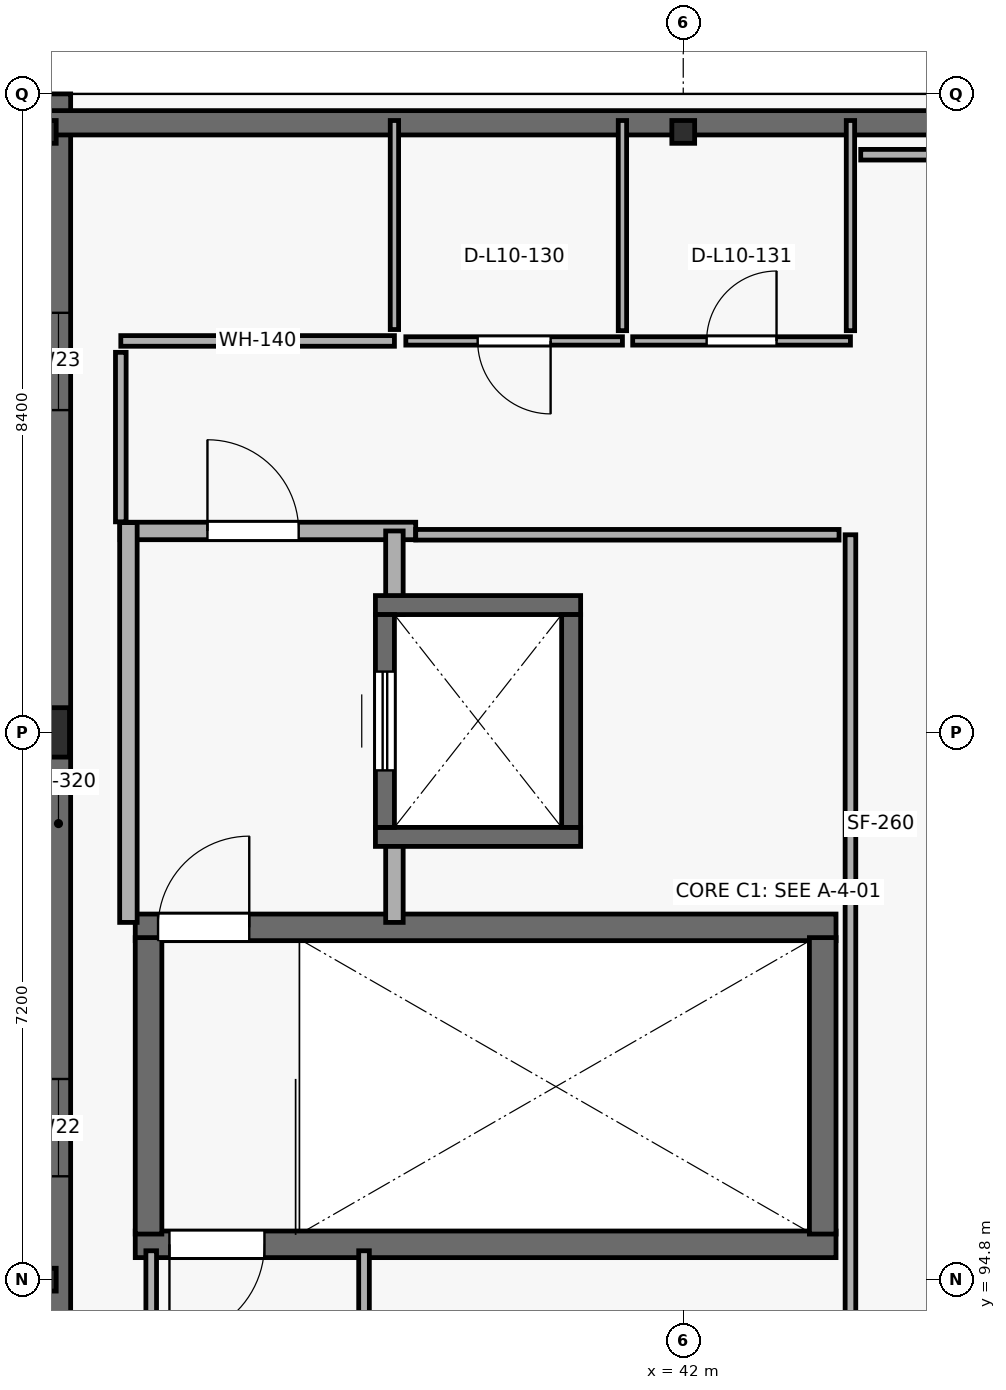
"""IFC4 building model, lengths in metres.
Left out: names, types, materials, properties, quantities, classifications, styles, units other than length and angle.
Written with IfcOpenShell. Run it as: python <this file> out.ifc"""

import sys

from ifc_helpers import new_model, si_unit, direction, frame, frame_2d, origin, origin_2d, place, context, subcontext, project, spatial, rectangle, hollow_rectangle, extrude, element, fill, save


model = new_model("IFC4")
c1 = context("Model", 3, precision=1e-05, world=origin(), true_north=direction((0.0, 1.0)))
c2 = subcontext(c1, "Body", "Model", "MODEL_VIEW")
j1 = project(units=[si_unit("LENGTHUNIT", "METRE"), si_unit("PLANEANGLEUNIT", "RADIAN")], contexts=[c1])
p1 = place(None, origin())
s1 = spatial("IfcSite", under=j1, at=p1, CompositionType="ELEMENT")
p2 = place(p1, origin())
s2 = spatial("IfcBuilding", under=s1, at=p2, CompositionType="ELEMENT")
p3 = place(p2, frame((0.0, 0.0, 44.7)))
s3 = spatial("IfcBuildingStorey", under=s2, at=p3, CompositionType="ELEMENT", Elevation=44.7)
p4 = place(p3, frame((33.6, 94.8, 0.0), z_axis=(0.0, 0.0, 1.0), x_axis=(1.0, 0.0, 0.0)))
e1 = element("IfcColumn", 1, at=p4, inside=s3, PredefinedType="COLUMN", context=c2, shape_type="SweptSolid", body=[
    extrude(hollow_rectangle(XDim=0.3, YDim=0.3, WallThickness=0.012, at=origin_2d()), origin(), (0.0, 0.0, 1.0), 4.8),
])
p5 = place(p3, frame((33.6, 102.0, 0.0), z_axis=(0.0, 0.0, 1.0), x_axis=(1.0, 0.0, 0.0)))
e2 = element("IfcColumn", 2, at=p5, inside=s3, PredefinedType="COLUMN", context=c2, shape_type="SweptSolid", body=[
    extrude(rectangle(XDim=0.65, YDim=0.65, at=origin_2d()), origin(), (0.0, 0.0, 1.0), 4.8),
])
for number, where, z_axis, x_axis in (
    (3, (33.6, 109.9, 0.0), (0.0, 0.0, 1.0), (1.0, 0.0, 0.0)),
    (4, (42.0, 109.9, 0.0), (0.0, 0.0, 1.0), (1.0, 0.0, 0.0)),
):
    element("IfcColumn", number, at=place(p3, frame(where, z_axis=z_axis, x_axis=x_axis)), inside=s3, PredefinedType="COLUMN", context=c2, shape_type="SweptSolid", body=[
        extrude(hollow_rectangle(XDim=0.3, YDim=0.3, WallThickness=0.012, at=origin_2d()), origin(), (0.0, 0.0, 1.0), 8.689),
    ])
p6 = place(p3, frame((33.78, 91.2, 0.0), z_axis=(0.0, 0.0, 1.0), x_axis=(0.0, 1.0, 0.0)))
e5 = element("IfcWall", 5, at=p6, inside=s3, PredefinedType="SOLIDWALL", context=c2, shape_type="SweptSolid", body=[
    extrude(rectangle(XDim=19.2, YDim=0.32, at=frame_2d((9.6, 0.0))), origin(), (0.0, 0.0, 1.0), 4.58),
])
p7 = place(p6, frame((4.96, 0.0, 0.75)))
e6 = element("IfcOpeningElement", 6, at=p7, cuts=e5, PredefinedType="OPENING", context=c2, shape_type="SweptSolid", body=[
    extrude(rectangle(XDim=1.28, YDim=2.25, at=frame_2d((0.64, 1.125))), frame((0.0, 0.17, 0.0), z_axis=(0.0, -1.0, 0.0), x_axis=(1.0, 0.0, 0.0)), (0.0, 0.0, 1.0), 0.34),
])
p8 = place(p6, frame((15.04, 0.0, 0.75)))
e7 = element("IfcOpeningElement", 7, at=p8, cuts=e5, PredefinedType="OPENING", context=c2, shape_type="SweptSolid", body=[
    extrude(rectangle(XDim=1.28, YDim=2.65, at=frame_2d((0.64, 1.325))), frame((0.0, 0.17, 0.0), z_axis=(0.0, -1.0, 0.0), x_axis=(1.0, 0.0, 0.0)), (0.0, 0.0, 1.0), 0.34),
])
p9 = place(p3, frame((33.6, 110.02, 0.0), z_axis=(0.0, 0.0, 1.0), x_axis=(1.0, 0.0, 0.0)))
e8 = element("IfcWall", 8, at=p9, inside=s3, PredefinedType="SOLIDWALL", context=c2, shape_type="SweptSolid", body=[
    extrude(rectangle(XDim=33.6, YDim=0.32, at=frame_2d((16.8, 0.0))), origin(), (0.0, 0.0, 1.0), 4.58),
])
p10 = place(p3, frame((34.79, 95.265, 0.0), z_axis=(0.0, 0.0, 1.0), x_axis=(1.0, 0.0, 0.0)))
e9 = element("IfcWall", 9, at=p10, inside=s3, PredefinedType="SHEAR", context=c2, shape_type="SweptSolid", body=[
    extrude(rectangle(XDim=9.22, YDim=0.35, at=frame_2d((4.61, 0.0))), origin(), (0.0, 0.0, 1.0), 4.58),
])
p11 = place(p10, frame((0.45, 0.0, 0.0)))
e10 = element("IfcOpeningElement", 10, at=p11, cuts=e9, PredefinedType="OPENING", context=c2, shape_type="SweptSolid", body=[
    extrude(rectangle(XDim=1.25, YDim=2.2, at=frame_2d((0.625, 1.1))), frame((0.0, 0.185, 0.0), z_axis=(0.0, -1.0, 0.0), x_axis=(1.0, 0.0, 0.0)), (0.0, 0.0, 1.0), 0.37),
])
p12 = place(p3, frame((44.01, 99.435, 0.0), z_axis=(0.0, 0.0, 1.0), x_axis=(-1.0, 0.0, 0.0)))
e11 = element("IfcWall", 11, at=p12, inside=s3, PredefinedType="SHEAR", context=c2, shape_type="SweptSolid", body=[
    extrude(rectangle(XDim=9.22, YDim=0.35, at=frame_2d((4.61, 0.0))), origin(), (0.0, 0.0, 1.0), 4.58),
])
p13 = place(p12, frame((7.72, 0.0, 0.0)))
e12 = element("IfcOpeningElement", 12, at=p13, cuts=e11, PredefinedType="OPENING", context=c2, shape_type="SweptSolid", body=[
    extrude(rectangle(XDim=1.2, YDim=2.2, at=frame_2d((0.6, 1.1))), frame((0.0, 0.185, 0.0), z_axis=(0.0, -1.0, 0.0), x_axis=(1.0, 0.0, 0.0)), (0.0, 0.0, 1.0), 0.37),
])
for number, where, z_axis, x_axis in (
    (13, (34.965, 95.4, 0.0), (0.0, 0.0, 1.0), (0.0, 1.0, 0.0)),
    (14, (43.835, 99.3, 0.0), (0.0, 0.0, 1.0), (0.0, -1.0, 0.0)),
):
    element("IfcWall", number, at=place(p3, frame(where, z_axis=z_axis, x_axis=x_axis)), inside=s3, PredefinedType="SHEAR", context=c2, shape_type="SweptSolid", body=[
        extrude(rectangle(XDim=3.9, YDim=0.35, at=frame_2d((1.95, 0.0))), origin(), (0.0, 0.0, 1.0), 4.58),
    ])
p14 = place(p3, frame((34.59, 104.65, 0.0), z_axis=(0.0, 0.0, 1.0), x_axis=(1.0, 0.0, 0.0)))
e15 = element("IfcWall", 15, at=p14, inside=s3, PredefinedType="PARTITIONING", context=c2, shape_type="SweptSolid", body=[
    extrude(rectangle(XDim=3.89, YDim=0.23, at=frame_2d((1.945, 0.0))), origin(), (0.0, 0.0, 1.0), 4.58),
])
p15 = place(p14, frame((1.15, 0.0, 0.0)))
e16 = element("IfcOpeningElement", 16, at=p15, cuts=e15, PredefinedType="OPENING", context=c2, shape_type="SweptSolid", body=[
    extrude(rectangle(XDim=1.2, YDim=2.2, at=frame_2d((0.6, 1.1))), frame((0.0, 0.125, 0.0), z_axis=(0.0, -1.0, 0.0), x_axis=(1.0, 0.0, 0.0)), (0.0, 0.0, 1.0), 0.25),
])
p16 = place(p3, frame((34.7, 99.5, 0.0), z_axis=(0.0, 0.0, 1.0), x_axis=(0.0, 1.0, 0.0)))
e17 = element("IfcWall", 17, at=p16, inside=s3, PredefinedType="PARTITIONING", context=c2, shape_type="SweptSolid", body=[
    extrude(rectangle(XDim=5.26, YDim=0.23, at=frame_2d((2.63, 0.0))), origin(), (0.0, 0.0, 1.0), 4.58),
])
p17 = place(p3, frame((38.2, 104.65, 0.0), z_axis=(0.0, 0.0, 1.0), x_axis=(0.0, -1.0, 0.0)))
e18 = element("IfcWall", 18, at=p17, inside=s3, PredefinedType="PARTITIONING", context=c2, shape_type="SweptSolid", body=[
    extrude(rectangle(XDim=1.1, YDim=0.23, at=frame_2d((0.55, 0.0))), origin(), (0.0, 0.0, 1.0), 4.58),
])
p18 = place(p3, frame((38.2, 100.75, 0.0), z_axis=(0.0, 0.0, 1.0), x_axis=(0.0, -1.0, 0.0)))
e19 = element("IfcWall", 19, at=p18, inside=s3, PredefinedType="PARTITIONING", context=c2, shape_type="SweptSolid", body=[
    extrude(rectangle(XDim=1.25, YDim=0.23, at=frame_2d((0.625, 0.0))), origin(), (0.0, 0.0, 1.0), 4.58),
])
for number, where, z_axis, x_axis in (
    (20, (37.95, 100.625, 0.0), (0.0, 0.0, 1.0), (1.0, 0.0, 0.0)),
    (21, (40.65, 103.675, 0.0), (0.0, 0.0, 1.0), (-1.0, 0.0, 0.0)),
):
    element("IfcWall", number, at=place(p3, frame(where, z_axis=z_axis, x_axis=x_axis)), inside=s3, PredefinedType="SHEAR", context=c2, shape_type="SweptSolid", body=[
        extrude(rectangle(XDim=2.7, YDim=0.25, at=frame_2d((1.35, 0.0))), origin(), (0.0, 0.0, 1.0), 4.58),
    ])
p19 = place(p3, frame((38.075, 100.75, 0.0), z_axis=(0.0, 0.0, 1.0), x_axis=(0.0, 1.0, 0.0)))
e22 = element("IfcWall", 22, at=p19, inside=s3, PredefinedType="SHEAR", context=c2, shape_type="SweptSolid", body=[
    extrude(rectangle(XDim=2.8, YDim=0.25, at=frame_2d((1.4, 0.0))), origin(), (0.0, 0.0, 1.0), 4.58),
])
p20 = place(p19, frame((0.75, 0.0, 0.0)))
e23 = element("IfcOpeningElement", 23, at=p20, cuts=e22, PredefinedType="OPENING", context=c2, shape_type="SweptSolid", body=[
    extrude(rectangle(XDim=1.3, YDim=2.25, at=frame_2d((0.65, 1.125))), frame((0.0, 0.135, 0.0), z_axis=(0.0, -1.0, 0.0), x_axis=(1.0, 0.0, 0.0)), (0.0, 0.0, 1.0), 0.27),
])
p21 = place(p3, frame((40.525, 103.55, 0.0), z_axis=(0.0, 0.0, 1.0), x_axis=(0.0, -1.0, 0.0)))
e24 = element("IfcWall", 24, at=p21, inside=s3, PredefinedType="SHEAR", context=c2, shape_type="SweptSolid", body=[
    extrude(rectangle(XDim=2.8, YDim=0.25, at=frame_2d((1.4, 0.0))), origin(), (0.0, 0.0, 1.0), 4.58),
])
p22 = place(p3, frame((44.2, 104.6, 0.0), z_axis=(0.0, 0.0, 1.0), x_axis=(0.0, -1.0, 0.0)))
e25 = element("IfcWall", 25, at=p22, inside=s3, PredefinedType="PARTITIONING", context=c2, shape_type="SweptSolid", body=[
    extrude(rectangle(XDim=10.75, YDim=0.14, at=frame_2d((5.375, 0.0))), origin(), (0.0, 0.0, 1.0), 4.58),
])
p23 = place(p3, frame((38.48, 104.6, 0.0), z_axis=(0.0, 0.0, 1.0), x_axis=(1.0, 0.0, 0.0)))
e26 = element("IfcWall", 26, at=p23, inside=s3, PredefinedType="PARTITIONING", context=c2, shape_type="SweptSolid", body=[
    extrude(rectangle(XDim=5.57, YDim=0.14, at=frame_2d((2.785, 0.0))), origin(), (0.0, 0.0, 1.0), 4.58),
])
p24 = place(p3, frame((38.2, 107.15, 0.0), z_axis=(0.0, 0.0, 1.0), x_axis=(-1.0, 0.0, 0.0)))
e27 = element("IfcWall", 27, at=p24, inside=s3, PredefinedType="PARTITIONING", context=c2, shape_type="SweptSolid", body=[
    extrude(rectangle(XDim=3.6, YDim=0.14, at=frame_2d((1.8, 0.0))), origin(), (0.0, 0.0, 1.0), 4.58),
])
p25 = place(p3, frame((41.2, 107.15, 0.0), z_axis=(0.0, 0.0, 1.0), x_axis=(-1.0, 0.0, 0.0)))
e28 = element("IfcWall", 28, at=p25, inside=s3, PredefinedType="PARTITIONING", context=c2, shape_type="SweptSolid", body=[
    extrude(rectangle(XDim=2.85, YDim=0.11, at=frame_2d((1.425, 0.0))), origin(), (0.0, 0.0, 1.0), 4.58),
])
p26 = place(p25, frame((0.945, 0.0, 0.0)))
e29 = element("IfcOpeningElement", 29, at=p26, cuts=e28, PredefinedType="OPENING", context=c2, shape_type="SweptSolid", body=[
    extrude(rectangle(XDim=0.96, YDim=2.14, at=frame_2d((0.48, 1.07))), frame((0.0, 0.065, 0.0), z_axis=(0.0, -1.0, 0.0), x_axis=(1.0, 0.0, 0.0)), (0.0, 0.0, 1.0), 0.13),
])
p27 = place(p3, frame((44.2, 107.15, 0.0), z_axis=(0.0, 0.0, 1.0), x_axis=(-1.0, 0.0, 0.0)))
e30 = element("IfcWall", 30, at=p27, inside=s3, PredefinedType="PARTITIONING", context=c2, shape_type="SweptSolid", body=[
    extrude(rectangle(XDim=2.865, YDim=0.11, at=frame_2d((1.433, 0.0))), origin(), (0.0, 0.0, 1.0), 4.58),
])
p28 = place(p27, frame((0.972, 0.0, 0.0)))
e31 = element("IfcOpeningElement", 31, at=p28, cuts=e30, PredefinedType="OPENING", context=c2, shape_type="SweptSolid", body=[
    extrude(rectangle(XDim=0.92, YDim=2.12, at=frame_2d((0.46, 1.06))), frame((0.0, 0.065, 0.0), z_axis=(0.0, -1.0, 0.0), x_axis=(1.0, 0.0, 0.0)), (0.0, 0.0, 1.0), 0.13),
])
p29 = place(p3, frame((41.2, 110.05, 0.0), z_axis=(0.0, 0.0, 1.0), x_axis=(0.0, -1.0, 0.0)))
e32 = element("IfcWall", 32, at=p29, inside=s3, PredefinedType="PARTITIONING", context=c2, shape_type="SweptSolid", body=[
    extrude(rectangle(XDim=2.765, YDim=0.11, at=frame_2d((1.383, 0.0))), origin(), (0.0, 0.0, 1.0), 4.58),
])
p30 = place(p3, frame((38.2, 107.3, 0.0), z_axis=(0.0, 0.0, 1.0), x_axis=(0.0, 1.0, 0.0)))
e33 = element("IfcWall", 33, at=p30, inside=s3, PredefinedType="PARTITIONING", context=c2, shape_type="SweptSolid", body=[
    extrude(rectangle(XDim=2.75, YDim=0.11, at=frame_2d((1.375, 0.0))), origin(), (0.0, 0.0, 1.0), 4.58),
])
p31 = place(p3, frame((44.2, 110.05, 0.0), z_axis=(0.0, 0.0, 1.0), x_axis=(0.0, -1.0, 0.0)))
e34 = element("IfcWall", 34, at=p31, inside=s3, PredefinedType="PARTITIONING", context=c2, shape_type="SweptSolid", body=[
    extrude(rectangle(XDim=2.765, YDim=0.11, at=frame_2d((1.383, 0.0))), origin(), (0.0, 0.0, 1.0), 4.58),
])
p32 = place(p3, frame((34.6, 107.0, 0.0), z_axis=(0.0, 0.0, 1.0), x_axis=(0.0, -1.0, 0.0)))
e35 = element("IfcWall", 35, at=p32, inside=s3, PredefinedType="PARTITIONING", context=c2, shape_type="SweptSolid", body=[
    extrude(rectangle(XDim=2.23, YDim=0.14, at=frame_2d((1.115, 0.0))), origin(), (0.0, 0.0, 1.0), 4.58),
])
p33 = place(p3, frame((46.25, 109.6, 0.0), z_axis=(0.0, 0.0, 1.0), x_axis=(-1.0, 0.0, 0.0)))
e36 = element("IfcWall", 36, at=p33, inside=s3, PredefinedType="PARTITIONING", context=c2, shape_type="SweptSolid", body=[
    extrude(rectangle(XDim=1.915, YDim=0.14, at=frame_2d((0.958, 0.0))), origin(), (0.0, 0.0, 1.0), 4.58),
])
p34 = place(p3, frame((37.8, 94.0, 0.0), z_axis=(0.0, 0.0, 1.0), x_axis=(0.0, 1.0, 0.0)))
e37 = element("IfcWall", 37, at=p34, inside=s3, PredefinedType="PARTITIONING", context=c2, shape_type="SweptSolid", body=[
    extrude(rectangle(XDim=1.18, YDim=0.14, at=frame_2d((0.59, 0.0))), origin(), (0.0, 0.0, 1.0), 4.58),
])
p35 = place(p3, frame((35.0, 95.18, 0.0), z_axis=(0.0, 0.0, 1.0), x_axis=(0.0, -1.0, 0.0)))
e38 = element("IfcWall", 38, at=p35, inside=s3, PredefinedType="PARTITIONING", context=c2, shape_type="SweptSolid", body=[
    extrude(rectangle(XDim=1.33, YDim=0.14, at=frame_2d((0.665, 0.0))), origin(), (0.0, 0.0, 1.0), 4.58),
])
p36 = place(p7, origin())
e39 = element("IfcWindow", 39, at=p36, inside=s3, PartitioningType="SINGLE_PANEL", PredefinedType="WINDOW", context=c2, shape_type="SweptSolid", body=[
    extrude(rectangle(XDim=1.28, YDim=2.25, at=frame_2d((0.64, 1.125))), frame((0.0, 0.03, 0.0), z_axis=(0.0, -1.0, 0.0), x_axis=(1.0, 0.0, 0.0)), (0.0, 0.0, 1.0), 0.06),
])
fill(e6, e39)
p37 = place(p8, origin())
e40 = element("IfcWindow", 40, at=p37, inside=s3, PartitioningType="SINGLE_PANEL", PredefinedType="WINDOW", context=c2, shape_type="SweptSolid", body=[
    extrude(rectangle(XDim=1.28, YDim=2.65, at=frame_2d((0.64, 1.325))), frame((0.0, 0.03, 0.0), z_axis=(0.0, -1.0, 0.0), x_axis=(1.0, 0.0, 0.0)), (0.0, 0.0, 1.0), 0.06),
])
fill(e7, e40)
p38 = place(p11, origin())
e41 = element("IfcDoor", 41, at=p38, inside=s3, OperationType="SINGLE_SWING_RIGHT", PredefinedType="DOOR", context=c2, shape_type="SweptSolid", body=[
    extrude(rectangle(XDim=1.25, YDim=2.2, at=frame_2d((0.625, 1.1))), frame((0.0, 0.025, 0.0), z_axis=(0.0, -1.0, 0.0), x_axis=(1.0, 0.0, 0.0)), (0.0, 0.0, 1.0), 0.05),
])
fill(e10, e41)
p39 = place(p13, origin())
e42 = element("IfcDoor", 42, at=p39, inside=s3, OperationType="SINGLE_SWING_RIGHT", PredefinedType="DOOR", context=c2, shape_type="SweptSolid", body=[
    extrude(rectangle(XDim=1.2, YDim=2.2, at=frame_2d((0.6, 1.1))), frame((0.0, 0.025, 0.0), z_axis=(0.0, -1.0, 0.0), x_axis=(1.0, 0.0, 0.0)), (0.0, 0.0, 1.0), 0.05),
])
fill(e12, e42)
p40 = place(p15, origin())
e43 = element("IfcDoor", 43, at=p40, inside=s3, OperationType="SINGLE_SWING_LEFT", PredefinedType="DOOR", context=c2, shape_type="SweptSolid", body=[
    extrude(rectangle(XDim=1.2, YDim=2.2, at=frame_2d((0.6, 1.1))), frame((0.0, 0.025, 0.0), z_axis=(0.0, -1.0, 0.0), x_axis=(1.0, 0.0, 0.0)), (0.0, 0.0, 1.0), 0.05),
])
fill(e16, e43)
p41 = place(p20, origin())
e44 = element("IfcDoor", 44, at=p41, inside=s3, OperationType="SLIDING_TO_LEFT", PredefinedType="DOOR", context=c2, shape_type="SweptSolid", body=[
    extrude(rectangle(XDim=1.3, YDim=2.25, at=frame_2d((0.65, 1.125))), frame((0.0, 0.025, 0.0), z_axis=(0.0, -1.0, 0.0), x_axis=(1.0, 0.0, 0.0)), (0.0, 0.0, 1.0), 0.05),
])
fill(e23, e44)
p42 = place(p26, origin())
e45 = element("IfcDoor", 45, at=p42, inside=s3, OperationType="SINGLE_SWING_LEFT", PredefinedType="DOOR", context=c2, shape_type="SweptSolid", body=[
    extrude(rectangle(XDim=0.96, YDim=2.14, at=frame_2d((0.48, 1.07))), frame((0.0, 0.025, 0.0), z_axis=(0.0, -1.0, 0.0), x_axis=(1.0, 0.0, 0.0)), (0.0, 0.0, 1.0), 0.05),
])
fill(e29, e45)
p43 = place(p28, origin())
e46 = element("IfcDoor", 46, at=p43, inside=s3, OperationType="SINGLE_SWING_RIGHT", PredefinedType="DOOR", context=c2, shape_type="SweptSolid", body=[
    extrude(rectangle(XDim=0.92, YDim=2.12, at=frame_2d((0.46, 1.06))), frame((0.0, 0.025, 0.0), z_axis=(0.0, -1.0, 0.0), x_axis=(1.0, 0.0, 0.0)), (0.0, 0.0, 1.0), 0.05),
])
fill(e31, e46)
save(model, sys.argv[1])
